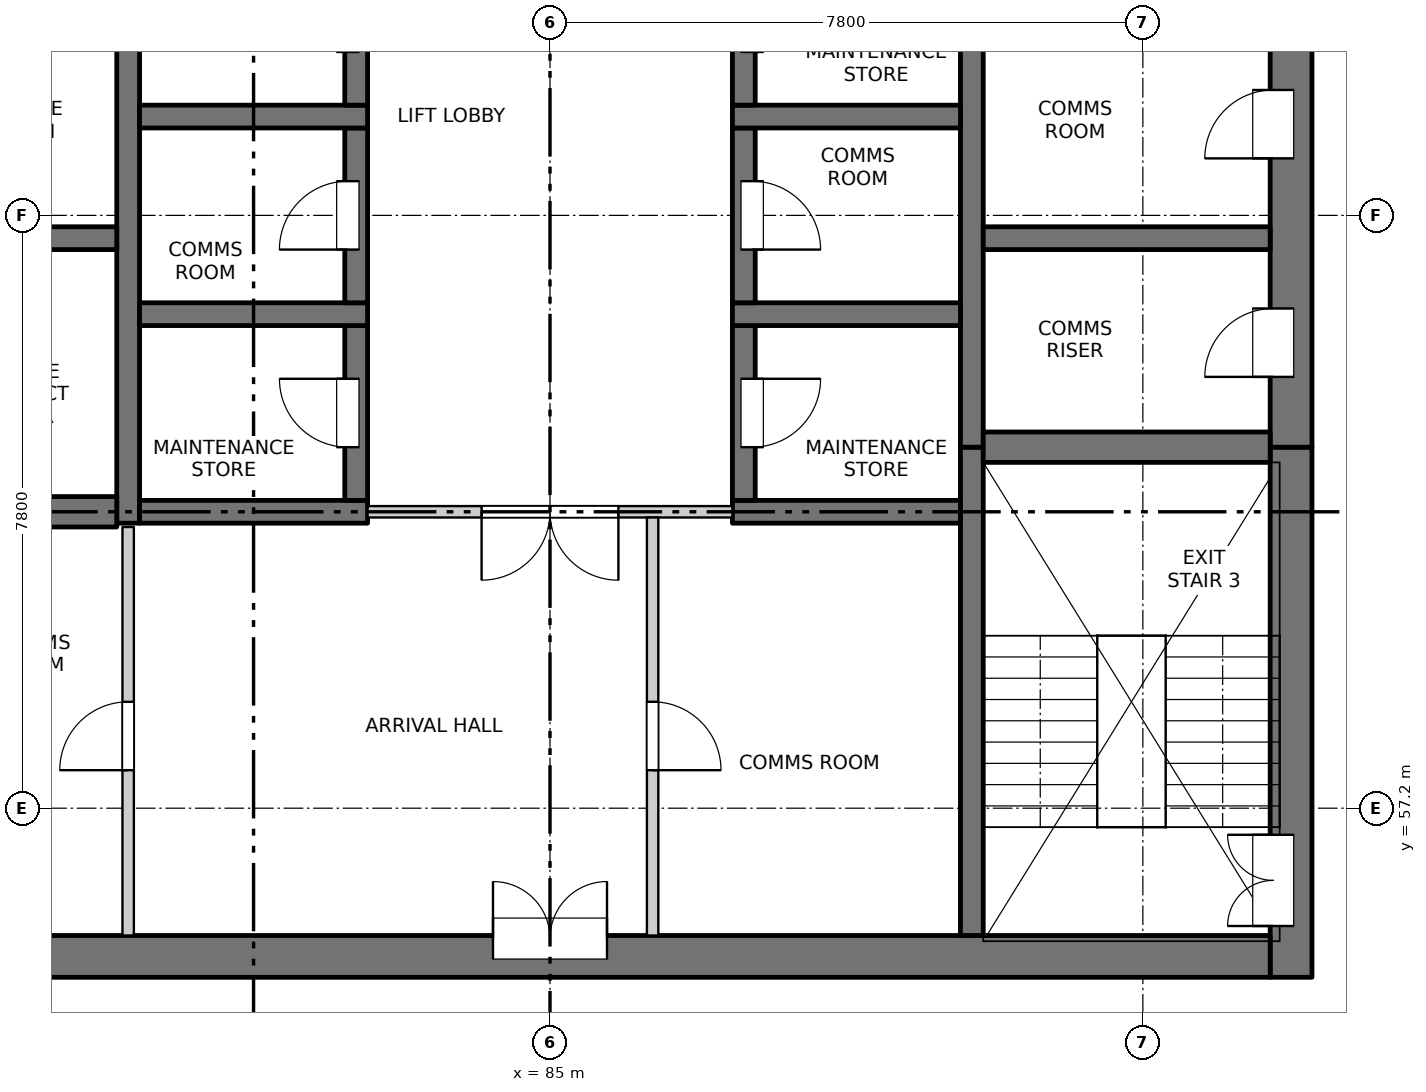
"""IFC4 building model, lengths in metres.
Left out: names, types, materials, properties, quantities, classifications, styles, units other than length and angle.
Written with IfcOpenShell. Run it as: python <this file> out.ifc"""

import sys

from ifc_helpers import new_model, si_unit, direction, frame, frame_2d, origin, place, context, subcontext, project, spatial, rectangle, extrude, element, fill, save


model = new_model("IFC4")
c1 = context("Model", 3, precision=1e-05, world=origin(), true_north=direction((0.0, 1.0)))
c2 = subcontext(c1, "Body", "Model", "MODEL_VIEW")
j1 = project(units=[si_unit("LENGTHUNIT", "METRE"), si_unit("PLANEANGLEUNIT", "RADIAN")], contexts=[c1])
p1 = place(None, origin())
s1 = spatial("IfcSite", under=j1, at=p1, CompositionType="ELEMENT")
p2 = place(p1, origin())
s2 = spatial("IfcBuilding", under=s1, at=p2, CompositionType="ELEMENT")
p3 = place(p2, frame((0.0, 0.0, 140.7)))
s3 = spatial("IfcBuildingStorey", under=s2, at=p3, CompositionType="ELEMENT", Elevation=140.7)
p4 = place(p3, frame((94.75, 54.975, -0.25), z_axis=(0.0, 0.0, 1.0), x_axis=(0.0, 1.0, 0.0)))
e1 = element("IfcWall", 1, at=p4, inside=s3, PredefinedType="SOLIDWALL", context=c2, shape_type="SweptSolid", body=[
    extrude(rectangle(XDim=6.975, YDim=0.55, at=frame_2d((3.487, 0.0))), origin(), (0.0, 0.0, 1.0), 3.35),
])
p5 = place(p4, frame((0.675, 0.0, 0.25)))
e2 = element("IfcOpeningElement", 2, at=p5, cuts=e1, PredefinedType="OPENING", context=c2, shape_type="SweptSolid", body=[
    extrude(rectangle(XDim=1.2, YDim=2.1, at=frame_2d((0.6, 1.05))), frame((0.0, 0.285, 0.0), z_axis=(0.0, -1.0, 0.0), x_axis=(1.0, 0.0, 0.0)), (0.0, 0.0, 1.0), 0.57),
])
p6 = place(p3, frame((94.75, 61.95, -0.25), z_axis=(0.0, 0.0, 1.0), x_axis=(0.0, 1.0, 0.0)))
e3 = element("IfcWall", 3, at=p6, inside=s3, PredefinedType="SOLIDWALL", context=c2, shape_type="SweptSolid", body=[
    extrude(rectangle(XDim=15.35, YDim=0.55, at=frame_2d((7.675, 0.0))), origin(), (0.0, 0.0, 1.0), 3.35),
])
p7 = place(p6, frame((0.925, 0.0, 0.25)))
e4 = element("IfcOpeningElement", 4, at=p7, cuts=e3, PredefinedType="OPENING", context=c2, shape_type="SweptSolid", body=[
    extrude(rectangle(XDim=0.9, YDim=2.1, at=frame_2d((0.45, 1.05))), frame((0.0, 0.285, 0.0), z_axis=(0.0, -1.0, 0.0), x_axis=(1.0, 0.0, 0.0)), (0.0, 0.0, 1.0), 0.57),
])
p8 = place(p6, frame((3.8, 0.0, 0.25)))
e5 = element("IfcOpeningElement", 5, at=p8, cuts=e3, PredefinedType="OPENING", context=c2, shape_type="SweptSolid", body=[
    extrude(rectangle(XDim=0.9, YDim=2.1, at=frame_2d((0.45, 1.05))), frame((0.0, 0.285, 0.0), z_axis=(0.0, -1.0, 0.0), x_axis=(1.0, 0.0, 0.0)), (0.0, 0.0, 1.0), 0.57),
])
p9 = place(p6, frame((6.8, 0.0, 0.25)))
e6 = element("IfcOpeningElement", 6, at=p9, cuts=e3, PredefinedType="OPENING", context=c2, shape_type="SweptSolid", body=[
    extrude(rectangle(XDim=0.9, YDim=2.1, at=frame_2d((0.45, 1.05))), frame((0.0, 0.285, 0.0), z_axis=(0.0, -1.0, 0.0), x_axis=(1.0, 0.0, 0.0)), (0.0, 0.0, 1.0), 0.57),
])
p10 = place(p6, frame((9.8, 0.0, 0.25)))
e7 = element("IfcOpeningElement", 7, at=p10, cuts=e3, PredefinedType="OPENING", context=c2, shape_type="SweptSolid", body=[
    extrude(rectangle(XDim=0.9, YDim=2.1, at=frame_2d((0.45, 1.05))), frame((0.0, 0.285, 0.0), z_axis=(0.0, -1.0, 0.0), x_axis=(1.0, 0.0, 0.0)), (0.0, 0.0, 1.0), 0.57),
])
p11 = place(p6, frame((13.1, 0.0, 0.25)))
e8 = element("IfcOpeningElement", 8, at=p11, cuts=e3, PredefinedType="OPENING", context=c2, shape_type="SweptSolid", body=[
    extrude(rectangle(XDim=0.9, YDim=2.1, at=frame_2d((0.45, 1.05))), frame((0.0, 0.285, 0.0), z_axis=(0.0, -1.0, 0.0), x_axis=(1.0, 0.0, 0.0)), (0.0, 0.0, 1.0), 0.57),
])
p12 = place(p3, frame((75.525, 55.25, -0.25), z_axis=(0.0, 0.0, 1.0), x_axis=(1.0, 0.0, 0.0)))
e9 = element("IfcWall", 9, at=p12, inside=s3, PredefinedType="SOLIDWALL", context=c2, shape_type="SweptSolid", body=[
    extrude(rectangle(XDim=18.95, YDim=0.55, at=frame_2d((9.475, 0.0))), origin(), (0.0, 0.0, 1.0), 3.35),
])
p13 = place(p12, frame((8.725, 0.0, 0.25)))
e10 = element("IfcOpeningElement", 10, at=p13, cuts=e9, PredefinedType="OPENING", context=c2, shape_type="SweptSolid", body=[
    extrude(rectangle(XDim=1.5, YDim=2.1, at=frame_2d((0.75, 1.05))), frame((0.0, 0.285, 0.0), z_axis=(0.0, -1.0, 0.0), x_axis=(1.0, 0.0, 0.0)), (0.0, 0.0, 1.0), 0.57),
])
p14 = place(p3, frame((79.45, 60.95, -0.25), z_axis=(0.0, 0.0, 1.0), x_axis=(0.0, 1.0, 0.0)))
e11 = element("IfcWall", 11, at=p14, inside=s3, PredefinedType="SOLIDWALL", context=c2, shape_type="SweptSolid", body=[
    extrude(rectangle(XDim=16.35, YDim=0.3, at=frame_2d((8.175, 0.0))), origin(), (0.0, 0.0, 1.0), 3.35),
])
p15 = place(p3, frame((90.55, 55.525, -0.25), z_axis=(0.0, 0.0, 1.0), x_axis=(0.0, 1.0, 0.0)))
e12 = element("IfcWall", 12, at=p15, inside=s3, PredefinedType="SOLIDWALL", context=c2, shape_type="SweptSolid", body=[
    extrude(rectangle(XDim=6.425, YDim=0.3, at=frame_2d((3.212, 0.0))), origin(), (0.0, 0.0, 1.0), 3.35),
])
p16 = place(p3, frame((90.55, 61.95, -0.25), z_axis=(0.0, 0.0, 1.0), x_axis=(0.0, 1.0, 0.0)))
e13 = element("IfcWall", 13, at=p16, inside=s3, PredefinedType="SOLIDWALL", context=c2, shape_type="SweptSolid", body=[
    extrude(rectangle(XDim=15.35, YDim=0.3, at=frame_2d((7.675, 0.0))), origin(), (0.0, 0.0, 1.0), 3.35),
])
p17 = place(p3, frame((79.6, 61.1, -0.25), z_axis=(0.0, 0.0, 1.0), x_axis=(1.0, 0.0, 0.0)))
e14 = element("IfcWall", 14, at=p17, inside=s3, PredefinedType="SOLIDWALL", context=c2, shape_type="SweptSolid", body=[
    extrude(rectangle(XDim=3.0, YDim=0.3, at=frame_2d((1.5, 0.0))), origin(), (0.0, 0.0, 1.0), 3.35),
])
p18 = place(p3, frame((82.45, 61.25, -0.25), z_axis=(0.0, 0.0, 1.0), x_axis=(0.0, 1.0, 0.0)))
e15 = element("IfcWall", 15, at=p18, inside=s3, PredefinedType="SOLIDWALL", context=c2, shape_type="SweptSolid", body=[
    extrude(rectangle(XDim=2.3, YDim=0.3, at=frame_2d((1.15, 0.0))), origin(), (0.0, 0.0, 1.0), 3.35),
])
p19 = place(p18, frame((0.7, 0.0, 0.25)))
e16 = element("IfcOpeningElement", 16, at=p19, cuts=e15, PredefinedType="OPENING", context=c2, shape_type="SweptSolid", body=[
    extrude(rectangle(XDim=0.9, YDim=2.1, at=frame_2d((0.45, 1.05))), frame((0.0, 0.16, 0.0), z_axis=(0.0, -1.0, 0.0), x_axis=(1.0, 0.0, 0.0)), (0.0, 0.0, 1.0), 0.32),
])
p20 = place(p3, frame((79.6, 63.7, -0.25), z_axis=(0.0, 0.0, 1.0), x_axis=(1.0, 0.0, 0.0)))
e17 = element("IfcWall", 17, at=p20, inside=s3, PredefinedType="SOLIDWALL", context=c2, shape_type="SweptSolid", body=[
    extrude(rectangle(XDim=3.0, YDim=0.3, at=frame_2d((1.5, 0.0))), origin(), (0.0, 0.0, 1.0), 3.35),
])
p21 = place(p3, frame((82.45, 63.85, -0.25), z_axis=(0.0, 0.0, 1.0), x_axis=(0.0, 1.0, 0.0)))
e18 = element("IfcWall", 18, at=p21, inside=s3, PredefinedType="SOLIDWALL", context=c2, shape_type="SweptSolid", body=[
    extrude(rectangle(XDim=2.3, YDim=0.3, at=frame_2d((1.15, 0.0))), origin(), (0.0, 0.0, 1.0), 3.35),
])
p22 = place(p21, frame((0.7, 0.0, 0.25)))
e19 = element("IfcOpeningElement", 19, at=p22, cuts=e18, PredefinedType="OPENING", context=c2, shape_type="SweptSolid", body=[
    extrude(rectangle(XDim=0.9, YDim=2.1, at=frame_2d((0.45, 1.05))), frame((0.0, 0.16, 0.0), z_axis=(0.0, -1.0, 0.0), x_axis=(1.0, 0.0, 0.0)), (0.0, 0.0, 1.0), 0.32),
])
p23 = place(p3, frame((79.6, 66.3, -0.25), z_axis=(0.0, 0.0, 1.0), x_axis=(1.0, 0.0, 0.0)))
e20 = element("IfcWall", 20, at=p23, inside=s3, PredefinedType="SOLIDWALL", context=c2, shape_type="SweptSolid", body=[
    extrude(rectangle(XDim=3.0, YDim=0.3, at=frame_2d((1.5, 0.0))), origin(), (0.0, 0.0, 1.0), 3.35),
])
p24 = place(p3, frame((82.45, 66.45, -0.25), z_axis=(0.0, 0.0, 1.0), x_axis=(0.0, 1.0, 0.0)))
e21 = element("IfcWall", 21, at=p24, inside=s3, PredefinedType="SOLIDWALL", context=c2, shape_type="SweptSolid", body=[
    extrude(rectangle(XDim=2.3, YDim=0.3, at=frame_2d((1.15, 0.0))), origin(), (0.0, 0.0, 1.0), 3.35),
])
p25 = place(p24, frame((0.7, 0.0, 0.25)))
e22 = element("IfcOpeningElement", 22, at=p25, cuts=e21, PredefinedType="OPENING", context=c2, shape_type="SweptSolid", body=[
    extrude(rectangle(XDim=0.9, YDim=2.1, at=frame_2d((0.45, 1.05))), frame((0.0, 0.16, 0.0), z_axis=(0.0, -1.0, 0.0), x_axis=(1.0, 0.0, 0.0)), (0.0, 0.0, 1.0), 0.32),
])
p26 = place(p3, frame((87.4, 61.1, -0.25), z_axis=(0.0, 0.0, 1.0), x_axis=(1.0, 0.0, 0.0)))
e23 = element("IfcWall", 23, at=p26, inside=s3, PredefinedType="SOLIDWALL", context=c2, shape_type="SweptSolid", body=[
    extrude(rectangle(XDim=3.0, YDim=0.3, at=frame_2d((1.5, 0.0))), origin(), (0.0, 0.0, 1.0), 3.35),
])
p27 = place(p3, frame((87.55, 61.25, -0.25), z_axis=(0.0, 0.0, 1.0), x_axis=(0.0, 1.0, 0.0)))
e24 = element("IfcWall", 24, at=p27, inside=s3, PredefinedType="SOLIDWALL", context=c2, shape_type="SweptSolid", body=[
    extrude(rectangle(XDim=2.3, YDim=0.3, at=frame_2d((1.15, 0.0))), origin(), (0.0, 0.0, 1.0), 3.35),
])
p28 = place(p27, frame((0.7, 0.0, 0.25)))
e25 = element("IfcOpeningElement", 25, at=p28, cuts=e24, PredefinedType="OPENING", context=c2, shape_type="SweptSolid", body=[
    extrude(rectangle(XDim=0.9, YDim=2.1, at=frame_2d((0.45, 1.05))), frame((0.0, 0.16, 0.0), z_axis=(0.0, -1.0, 0.0), x_axis=(1.0, 0.0, 0.0)), (0.0, 0.0, 1.0), 0.32),
])
p29 = place(p3, frame((87.4, 63.7, -0.25), z_axis=(0.0, 0.0, 1.0), x_axis=(1.0, 0.0, 0.0)))
e26 = element("IfcWall", 26, at=p29, inside=s3, PredefinedType="SOLIDWALL", context=c2, shape_type="SweptSolid", body=[
    extrude(rectangle(XDim=3.0, YDim=0.3, at=frame_2d((1.5, 0.0))), origin(), (0.0, 0.0, 1.0), 3.35),
])
p30 = place(p3, frame((87.55, 63.85, -0.25), z_axis=(0.0, 0.0, 1.0), x_axis=(0.0, 1.0, 0.0)))
e27 = element("IfcWall", 27, at=p30, inside=s3, PredefinedType="SOLIDWALL", context=c2, shape_type="SweptSolid", body=[
    extrude(rectangle(XDim=2.3, YDim=0.3, at=frame_2d((1.15, 0.0))), origin(), (0.0, 0.0, 1.0), 3.35),
])
p31 = place(p30, frame((0.7, 0.0, 0.25)))
e28 = element("IfcOpeningElement", 28, at=p31, cuts=e27, PredefinedType="OPENING", context=c2, shape_type="SweptSolid", body=[
    extrude(rectangle(XDim=0.9, YDim=2.1, at=frame_2d((0.45, 1.05))), frame((0.0, 0.16, 0.0), z_axis=(0.0, -1.0, 0.0), x_axis=(1.0, 0.0, 0.0)), (0.0, 0.0, 1.0), 0.32),
])
p32 = place(p3, frame((87.4, 66.3, -0.25), z_axis=(0.0, 0.0, 1.0), x_axis=(1.0, 0.0, 0.0)))
e29 = element("IfcWall", 29, at=p32, inside=s3, PredefinedType="SOLIDWALL", context=c2, shape_type="SweptSolid", body=[
    extrude(rectangle(XDim=3.0, YDim=0.3, at=frame_2d((1.5, 0.0))), origin(), (0.0, 0.0, 1.0), 3.35),
])
p33 = place(p3, frame((87.55, 66.45, -0.25), z_axis=(0.0, 0.0, 1.0), x_axis=(0.0, 1.0, 0.0)))
e30 = element("IfcWall", 30, at=p33, inside=s3, PredefinedType="SOLIDWALL", context=c2, shape_type="SweptSolid", body=[
    extrude(rectangle(XDim=2.3, YDim=0.3, at=frame_2d((1.15, 0.0))), origin(), (0.0, 0.0, 1.0), 3.35),
])
p34 = place(p33, frame((0.7, 0.0, 0.25)))
e31 = element("IfcOpeningElement", 31, at=p34, cuts=e30, PredefinedType="OPENING", context=c2, shape_type="SweptSolid", body=[
    extrude(rectangle(XDim=0.9, YDim=2.1, at=frame_2d((0.45, 1.05))), frame((0.0, 0.16, 0.0), z_axis=(0.0, -1.0, 0.0), x_axis=(1.0, 0.0, 0.0)), (0.0, 0.0, 1.0), 0.32),
])
p35 = place(p3, frame((75.525, 61.1, -0.25), z_axis=(0.0, 0.0, 1.0), x_axis=(1.0, 0.0, 0.0)))
e32 = element("IfcWall", 32, at=p35, inside=s3, PredefinedType="SOLIDWALL", context=c2, shape_type="SweptSolid", body=[
    extrude(rectangle(XDim=3.775, YDim=0.4, at=frame_2d((1.888, 0.0))), origin(), (0.0, 0.0, 1.0), 3.35),
])
p36 = place(p3, frame((75.525, 64.7, -0.25), z_axis=(0.0, 0.0, 1.0), x_axis=(1.0, 0.0, 0.0)))
e33 = element("IfcWall", 33, at=p36, inside=s3, PredefinedType="SOLIDWALL", context=c2, shape_type="SweptSolid", body=[
    extrude(rectangle(XDim=3.775, YDim=0.3, at=frame_2d((1.888, 0.0))), origin(), (0.0, 0.0, 1.0), 3.35),
])
p37 = place(p3, frame((90.7, 61.95, -0.25), z_axis=(0.0, 0.0, 1.0), x_axis=(1.0, 0.0, 0.0)))
e34 = element("IfcWall", 34, at=p37, inside=s3, PredefinedType="SOLIDWALL", context=c2, shape_type="SweptSolid", body=[
    extrude(rectangle(XDim=3.775, YDim=0.4, at=frame_2d((1.888, 0.0))), origin(), (0.0, 0.0, 1.0), 3.35),
])
p38 = place(p3, frame((90.7, 64.7, -0.25), z_axis=(0.0, 0.0, 1.0), x_axis=(1.0, 0.0, 0.0)))
e35 = element("IfcWall", 35, at=p38, inside=s3, PredefinedType="SOLIDWALL", context=c2, shape_type="SweptSolid", body=[
    extrude(rectangle(XDim=3.775, YDim=0.3, at=frame_2d((1.888, 0.0))), origin(), (0.0, 0.0, 1.0), 3.35),
])
p39 = place(p3, frame((82.6, 61.1, 0.0), z_axis=(0.0, 0.0, 1.0), x_axis=(1.0, 0.0, 0.0)))
e36 = element("IfcWall", 36, at=p39, inside=s3, PredefinedType="PARTITIONING", context=c2, shape_type="SweptSolid", body=[
    extrude(rectangle(XDim=4.8, YDim=0.15, at=frame_2d((2.4, 0.0))), origin(), (0.0, 0.0, 1.0), 3.1),
])
p40 = place(p39, frame((1.5, 0.0, 0.0)))
e37 = element("IfcOpeningElement", 37, at=p40, cuts=e36, PredefinedType="OPENING", context=c2, shape_type="SweptSolid", body=[
    extrude(rectangle(XDim=1.8, YDim=2.1, at=frame_2d((0.9, 1.05))), frame((0.0, 0.085, 0.0), z_axis=(0.0, -1.0, 0.0), x_axis=(1.0, 0.0, 0.0)), (0.0, 0.0, 1.0), 0.17),
])
p41 = place(p3, frame((79.45, 55.525, 0.0), z_axis=(0.0, 0.0, 1.0), x_axis=(0.0, 1.0, 0.0)))
e38 = element("IfcWall", 38, at=p41, inside=s3, PredefinedType="PARTITIONING", context=c2, shape_type="SweptSolid", body=[
    extrude(rectangle(XDim=5.375, YDim=0.15, at=frame_2d((2.688, 0.0))), origin(), (0.0, 0.0, 1.0), 3.1),
])
p42 = place(p41, frame((2.175, 0.0, 0.0)))
e39 = element("IfcOpeningElement", 39, at=p42, cuts=e38, PredefinedType="OPENING", context=c2, shape_type="SweptSolid", body=[
    extrude(rectangle(XDim=0.9, YDim=2.1, at=frame_2d((0.45, 1.05))), frame((0.0, 0.085, 0.0), z_axis=(0.0, -1.0, 0.0), x_axis=(1.0, 0.0, 0.0)), (0.0, 0.0, 1.0), 0.17),
])
p43 = place(p3, frame((86.35, 55.525, 0.0), z_axis=(0.0, 0.0, 1.0), x_axis=(0.0, 1.0, 0.0)))
e40 = element("IfcWall", 40, at=p43, inside=s3, PredefinedType="PARTITIONING", context=c2, shape_type="SweptSolid", body=[
    extrude(rectangle(XDim=5.5, YDim=0.15, at=frame_2d((2.75, 0.0))), origin(), (0.0, 0.0, 1.0), 3.1),
])
p44 = place(p43, frame((2.175, 0.0, 0.0)))
e41 = element("IfcOpeningElement", 41, at=p44, cuts=e40, PredefinedType="OPENING", context=c2, shape_type="SweptSolid", body=[
    extrude(rectangle(XDim=0.9, YDim=2.1, at=frame_2d((0.45, 1.05))), frame((0.0, 0.085, 0.0), z_axis=(0.0, -1.0, 0.0), x_axis=(1.0, 0.0, 0.0)), (0.0, 0.0, 1.0), 0.17),
])
p45 = place(p13, origin())
e42 = element("IfcDoor", 42, at=p45, inside=s3, OperationType="DOUBLE_DOOR_SINGLE_SWING", PredefinedType="DOOR", context=c2, shape_type="SweptSolid", body=[
    extrude(rectangle(XDim=1.5, YDim=2.1, at=frame_2d((0.75, 1.05))), frame((0.0, 0.26, 0.0), z_axis=(0.0, -1.0, 0.0), x_axis=(1.0, 0.0, 0.0)), (0.0, 0.0, 1.0), 0.05),
])
fill(e10, e42)
p46 = place(p5, origin())
e43 = element("IfcDoor", 43, at=p46, inside=s3, OperationType="DOUBLE_DOOR_SINGLE_SWING", PredefinedType="DOOR", context=c2, shape_type="SweptSolid", body=[
    extrude(rectangle(XDim=1.2, YDim=2.1, at=frame_2d((0.6, 1.05))), frame((0.0, 0.26, 0.0), z_axis=(0.0, -1.0, 0.0), x_axis=(1.0, 0.0, 0.0)), (0.0, 0.0, 1.0), 0.05),
])
fill(e2, e43)
p47 = place(p42, origin())
e44 = element("IfcDoor", 44, at=p47, inside=s3, OperationType="SINGLE_SWING_LEFT", PredefinedType="DOOR", context=c2, shape_type="SweptSolid", body=[
    extrude(rectangle(XDim=0.9, YDim=2.1, at=frame_2d((0.45, 1.05))), frame((0.0, 0.025, 0.0), z_axis=(0.0, -1.0, 0.0), x_axis=(1.0, 0.0, 0.0)), (0.0, 0.0, 1.0), 0.05),
])
fill(e39, e44)
p48 = place(p44, origin())
e45 = element("IfcDoor", 45, at=p48, inside=s3, OperationType="SINGLE_SWING_RIGHT", PredefinedType="DOOR", context=c2, shape_type="SweptSolid", body=[
    extrude(rectangle(XDim=0.9, YDim=2.1, at=frame_2d((0.45, 1.05))), frame((0.0, 0.025, 0.0), z_axis=(0.0, -1.0, 0.0), x_axis=(1.0, 0.0, 0.0)), (0.0, 0.0, 1.0), 0.05),
])
fill(e41, e45)
p49 = place(p40, origin())
e46 = element("IfcDoor", 46, at=p49, inside=s3, OperationType="DOUBLE_DOOR_SINGLE_SWING", PredefinedType="DOOR", context=c2, shape_type="SweptSolid", body=[
    extrude(rectangle(XDim=1.8, YDim=2.1, at=frame_2d((0.9, 1.05))), frame((0.0, 0.025, 0.0), z_axis=(0.0, -1.0, 0.0), x_axis=(1.0, 0.0, 0.0)), (0.0, 0.0, 1.0), 0.05),
])
fill(e37, e46)
p50 = place(p19, origin())
e47 = element("IfcDoor", 47, at=p50, inside=s3, OperationType="SINGLE_SWING_RIGHT", PredefinedType="DOOR", context=c2, shape_type="SweptSolid", body=[
    extrude(rectangle(XDim=0.9, YDim=2.1, at=frame_2d((0.45, 1.05))), frame((0.0, 0.135, 0.0), z_axis=(0.0, -1.0, 0.0), x_axis=(1.0, 0.0, 0.0)), (0.0, 0.0, 1.0), 0.05),
])
fill(e16, e47)
p51 = place(p28, origin())
e48 = element("IfcDoor", 48, at=p51, inside=s3, OperationType="SINGLE_SWING_LEFT", PredefinedType="DOOR", context=c2, shape_type="SweptSolid", body=[
    extrude(rectangle(XDim=0.9, YDim=2.1, at=frame_2d((0.45, 1.05))), frame((0.0, -0.085, 0.0), z_axis=(0.0, -1.0, 0.0), x_axis=(1.0, 0.0, 0.0)), (0.0, 0.0, 1.0), 0.05),
])
fill(e25, e48)
p52 = place(p7, origin())
e49 = element("IfcDoor", 49, at=p52, inside=s3, OperationType="SINGLE_SWING_LEFT", PredefinedType="DOOR", context=c2, shape_type="SweptSolid", body=[
    extrude(rectangle(XDim=0.9, YDim=2.1, at=frame_2d((0.45, 1.05))), frame((0.0, 0.26, 0.0), z_axis=(0.0, -1.0, 0.0), x_axis=(1.0, 0.0, 0.0)), (0.0, 0.0, 1.0), 0.05),
])
fill(e4, e49)
p53 = place(p22, origin())
e50 = element("IfcDoor", 50, at=p53, inside=s3, OperationType="SINGLE_SWING_LEFT", PredefinedType="DOOR", context=c2, shape_type="SweptSolid", body=[
    extrude(rectangle(XDim=0.9, YDim=2.1, at=frame_2d((0.45, 1.05))), frame((0.0, 0.135, 0.0), z_axis=(0.0, -1.0, 0.0), x_axis=(1.0, 0.0, 0.0)), (0.0, 0.0, 1.0), 0.05),
])
fill(e19, e50)
p54 = place(p31, origin())
e51 = element("IfcDoor", 51, at=p54, inside=s3, OperationType="SINGLE_SWING_RIGHT", PredefinedType="DOOR", context=c2, shape_type="SweptSolid", body=[
    extrude(rectangle(XDim=0.9, YDim=2.1, at=frame_2d((0.45, 1.05))), frame((0.0, -0.085, 0.0), z_axis=(0.0, -1.0, 0.0), x_axis=(1.0, 0.0, 0.0)), (0.0, 0.0, 1.0), 0.05),
])
fill(e28, e51)
p55 = place(p8, origin())
e52 = element("IfcDoor", 52, at=p55, inside=s3, OperationType="SINGLE_SWING_LEFT", PredefinedType="DOOR", context=c2, shape_type="SweptSolid", body=[
    extrude(rectangle(XDim=0.9, YDim=2.1, at=frame_2d((0.45, 1.05))), frame((0.0, 0.26, 0.0), z_axis=(0.0, -1.0, 0.0), x_axis=(1.0, 0.0, 0.0)), (0.0, 0.0, 1.0), 0.05),
])
fill(e5, e52)
save(model, sys.argv[1])
